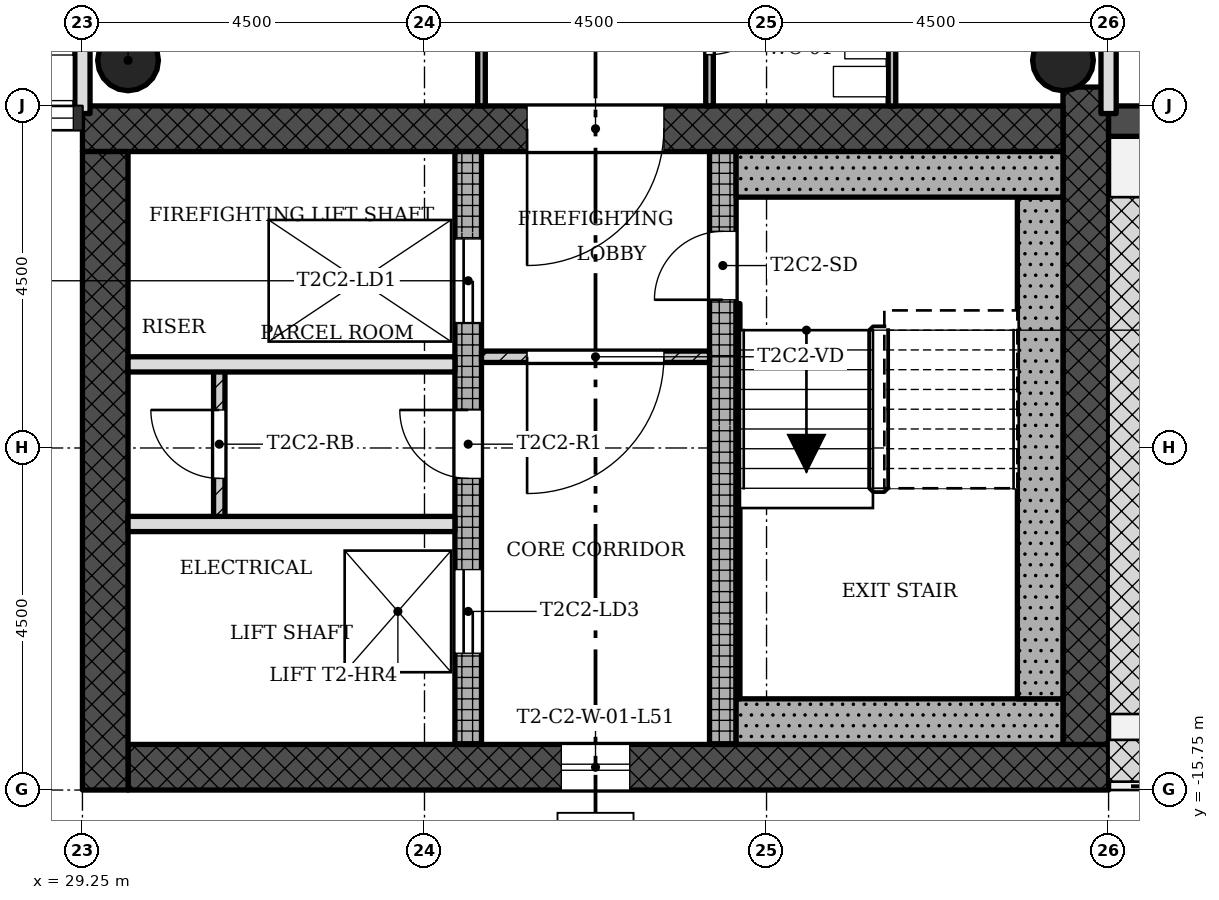
"""IFC4 building model, lengths in metres.
Left out: names, types, materials, properties, quantities, classifications, styles, units other than length and angle.
Written with IfcOpenShell. Run it as: python <this file> out.ifc"""

import sys

from ifc_helpers import new_model, si_unit, direction, frame, frame_2d, origin, origin_2d, place, context, subcontext, project, spatial, rectangle, hollow_circle, extrude, element, fill, save


model = new_model("IFC4")
c1 = context("Model", 3, precision=1e-05, world=origin(), true_north=direction((0.0, 1.0)))
c2 = subcontext(c1, "Body", "Model", "MODEL_VIEW")
j1 = project(units=[si_unit("LENGTHUNIT", "METRE"), si_unit("PLANEANGLEUNIT", "RADIAN")], contexts=[c1])
p1 = place(None, origin())
s1 = spatial("IfcSite", under=j1, at=p1, CompositionType="ELEMENT")
p2 = place(p1, origin())
s2 = spatial("IfcBuilding", under=s1, at=p2, CompositionType="ELEMENT")
p3 = place(p2, frame((0.0, 0.0, 185.8)))
s3 = spatial("IfcBuildingStorey", under=s2, at=p3, CompositionType="ELEMENT", Elevation=185.8)
p4 = place(p3, frame((29.85, -15.45, 0.0), z_axis=(0.0, 0.0, 1.0), x_axis=(1.0, 0.0, 0.0)))
e1 = element("IfcWall", 1, at=p4, inside=s3, PredefinedType="SHEAR", context=c2, shape_type="SweptSolid", body=[
    extrude(rectangle(XDim=12.9, YDim=0.6, at=frame_2d((6.45, 0.0))), origin(), (0.0, 0.0, 1.0), 3.4),
])
p5 = place(p4, frame((5.7, 0.0, 0.45)))
e2 = element("IfcOpeningElement", 2, at=p5, cuts=e1, PredefinedType="OPENING", context=c2, shape_type="SweptSolid", body=[
    extrude(rectangle(XDim=0.9, YDim=2.4, at=frame_2d((0.45, 1.2))), frame((0.0, 0.31, 0.0), z_axis=(0.0, -1.0, 0.0), x_axis=(1.0, 0.0, 0.0)), (0.0, 0.0, 1.0), 0.62),
])
p6 = place(p3, frame((42.45, -15.15, 0.0), z_axis=(0.0, 0.0, 1.0), x_axis=(0.0, 1.0, 0.0)))
e3 = element("IfcWall", 3, at=p6, inside=s3, PredefinedType="SHEAR", context=c2, shape_type="SweptSolid", body=[
    extrude(rectangle(XDim=8.648, YDim=0.6, at=frame_2d((4.324, 0.0))), origin(), (0.0, 0.0, 1.0), 3.4),
])
p7 = place(p3, frame((42.15, -7.05, 0.0), z_axis=(0.0, 0.0, 1.0), x_axis=(-1.0, 0.0, 0.0)))
e4 = element("IfcWall", 4, at=p7, inside=s3, PredefinedType="SHEAR", context=c2, shape_type="SweptSolid", body=[
    extrude(rectangle(XDim=12.9, YDim=0.6, at=frame_2d((6.45, 0.0))), origin(), (0.0, 0.0, 1.0), 3.4),
])
p8 = place(p7, frame((5.25, 0.0, 0.0)))
e5 = element("IfcOpeningElement", 5, at=p8, cuts=e4, PredefinedType="OPENING", context=c2, shape_type="SweptSolid", body=[
    extrude(rectangle(XDim=1.8, YDim=2.1, at=frame_2d((0.9, 1.05))), frame((0.0, 0.31, 0.0), z_axis=(0.0, -1.0, 0.0), x_axis=(1.0, 0.0, 0.0)), (0.0, 0.0, 1.0), 0.62),
])
p9 = place(p3, frame((29.55, -7.35, 0.0), z_axis=(0.0, 0.0, 1.0), x_axis=(0.0, -1.0, 0.0)))
e6 = element("IfcWall", 6, at=p9, inside=s3, PredefinedType="SHEAR", context=c2, shape_type="SweptSolid", body=[
    extrude(rectangle(XDim=8.4, YDim=0.6, at=frame_2d((4.2, 0.0))), origin(), (0.0, 0.0, 1.0), 3.4),
])
p10 = place(p3, frame((34.325, -15.15, 0.0), z_axis=(0.0, 0.0, 1.0), x_axis=(0.0, 1.0, 0.0)))
e7 = element("IfcWall", 7, at=p10, inside=s3, PredefinedType="SHEAR", context=c2, shape_type="SweptSolid", body=[
    extrude(rectangle(XDim=7.8, YDim=0.35, at=frame_2d((3.9, 0.0))), origin(), (0.0, 0.0, 1.0), 3.4),
])
p11 = place(p10, frame((5.55, 0.0, 0.0)))
e8 = element("IfcOpeningElement", 8, at=p11, cuts=e7, PredefinedType="OPENING", context=c2, shape_type="SweptSolid", body=[
    extrude(rectangle(XDim=1.1, YDim=2.1, at=frame_2d((0.55, 1.05))), frame((0.0, 0.185, 0.0), z_axis=(0.0, -1.0, 0.0), x_axis=(1.0, 0.0, 0.0)), (0.0, 0.0, 1.0), 0.37),
])
p12 = place(p10, frame((1.2, 0.0, 0.0)))
e9 = element("IfcOpeningElement", 9, at=p12, cuts=e7, PredefinedType="OPENING", context=c2, shape_type="SweptSolid", body=[
    extrude(rectangle(XDim=1.1, YDim=2.1, at=frame_2d((0.55, 1.05))), frame((0.0, 0.185, 0.0), z_axis=(0.0, -1.0, 0.0), x_axis=(1.0, 0.0, 0.0)), (0.0, 0.0, 1.0), 0.37),
])
p13 = place(p10, frame((3.5, 0.0, 0.0)))
e10 = element("IfcOpeningElement", 10, at=p13, cuts=e7, PredefinedType="OPENING", context=c2, shape_type="SweptSolid", body=[
    extrude(rectangle(XDim=0.9, YDim=2.1, at=frame_2d((0.45, 1.05))), frame((0.0, 0.185, 0.0), z_axis=(0.0, -1.0, 0.0), x_axis=(1.0, 0.0, 0.0)), (0.0, 0.0, 1.0), 0.37),
])
p14 = place(p3, frame((37.675, -15.15, 0.0), z_axis=(0.0, 0.0, 1.0), x_axis=(0.0, 1.0, 0.0)))
e11 = element("IfcWall", 11, at=p14, inside=s3, PredefinedType="SHEAR", context=c2, shape_type="SweptSolid", body=[
    extrude(rectangle(XDim=7.8, YDim=0.35, at=frame_2d((3.9, 0.0))), origin(), (0.0, 0.0, 1.0), 3.4),
])
p15 = place(p14, frame((5.85, 0.0, 0.0)))
e12 = element("IfcOpeningElement", 12, at=p15, cuts=e11, PredefinedType="OPENING", context=c2, shape_type="SweptSolid", body=[
    extrude(rectangle(XDim=0.9, YDim=2.1, at=frame_2d((0.45, 1.05))), frame((0.0, 0.185, 0.0), z_axis=(0.0, -1.0, 0.0), x_axis=(1.0, 0.0, 0.0)), (0.0, 0.0, 1.0), 0.37),
])
for number, where, z_axis, x_axis in (
    (13, (42.15, -6.15, 0.0), (0.0, 0.0, 1.0), (1.0, 0.0, 0.0)),
    (14, (29.85, -6.15, 0.0), (0.0, 0.0, 1.0), (1.0, 0.0, 0.0)),
):
    element("IfcColumn", number, at=place(p3, frame(where, z_axis=z_axis, x_axis=x_axis)), inside=s3, PredefinedType="COLUMN", context=c2, shape_type="SweptSolid", body=[
        extrude(hollow_circle(Radius=0.4, WallThickness=0.028, at=origin_2d()), origin(), (0.0, 0.0, 1.0), 3.4),
    ])
p16 = place(p3, frame((42.75, -6.95, -0.02), z_axis=(0.0, 0.0, 1.0), x_axis=(1.0, 0.0, 0.0)))
e15 = element("IfcWall", 15, at=p16, inside=s3, PredefinedType="STANDARD", context=c2, shape_type="SweptSolid", body=[
    extrude(rectangle(XDim=4.5, YDim=0.4, at=frame_2d((2.25, 0.0))), origin(), (0.0, 0.0, 1.0), 3.12),
])
p17 = place(p16, frame((1.35, 0.0, 0.02)))
e16 = element("IfcOpeningElement", 16, at=p17, cuts=e15, PredefinedType="OPENING", context=c2, shape_type="SweptSolid", body=[
    extrude(rectangle(XDim=1.8, YDim=2.1, at=frame_2d((0.9, 1.05))), frame((0.0, 0.21, 0.0), z_axis=(0.0, -1.0, 0.0), x_axis=(1.0, 0.0, 0.0)), (0.0, 0.0, 1.0), 0.42),
])
p18 = place(p3, frame((34.5, -10.05, 0.0), z_axis=(0.0, 0.0, 1.0), x_axis=(1.0, 0.0, 0.0)))
e17 = element("IfcWall", 17, at=p18, inside=s3, PredefinedType="PARTITIONING", context=c2, shape_type="SweptSolid", body=[
    extrude(rectangle(XDim=3.0, YDim=0.15, at=frame_2d((1.5, 0.0))), origin(), (0.0, 0.0, 1.0), 3.0),
])
p19 = place(p18, frame((0.6, 0.0, 0.0)))
e18 = element("IfcOpeningElement", 18, at=p19, cuts=e17, PredefinedType="OPENING", context=c2, shape_type="SweptSolid", body=[
    extrude(rectangle(XDim=1.8, YDim=2.1, at=frame_2d((0.9, 1.05))), frame((0.0, 0.085, 0.0), z_axis=(0.0, -1.0, 0.0), x_axis=(1.0, 0.0, 0.0)), (0.0, 0.0, 1.0), 0.17),
])
for number, where, z_axis, x_axis in (
    (19, (29.85, -12.25, 0.0), (0.0, 0.0, 1.0), (1.0, 0.0, 0.0)),
    (20, (29.85, -10.15, 0.0), (0.0, 0.0, 1.0), (1.0, 0.0, 0.0)),
):
    element("IfcWall", number, at=place(p3, frame(where, z_axis=z_axis, x_axis=x_axis)), inside=s3, PredefinedType="SOLIDWALL", context=c2, shape_type="SweptSolid", body=[
        extrude(rectangle(XDim=4.3, YDim=0.2, at=frame_2d((2.15, 0.0))), origin(), (0.0, 0.0, 1.0), 3.0),
    ])
p20 = place(p3, frame((31.05, -10.15, 0.0), z_axis=(0.0, 0.0, 1.0), x_axis=(0.0, -1.0, 0.0)))
e21 = element("IfcWall", 21, at=p20, inside=s3, PredefinedType="PARTITIONING", context=c2, shape_type="SweptSolid", body=[
    extrude(rectangle(XDim=2.1, YDim=0.15, at=frame_2d((1.05, 0.0))), origin(), (0.0, 0.0, 1.0), 3.0),
])
p21 = place(p20, frame((0.6, 0.0, 0.0)))
e22 = element("IfcOpeningElement", 22, at=p21, cuts=e21, PredefinedType="OPENING", context=c2, shape_type="SweptSolid", body=[
    extrude(rectangle(XDim=0.9, YDim=2.1, at=frame_2d((0.45, 1.05))), frame((0.0, 0.085, 0.0), z_axis=(0.0, -1.0, 0.0), x_axis=(1.0, 0.0, 0.0)), (0.0, 0.0, 1.0), 0.17),
])
p22 = place(p3, frame((42.75, -6.85, 0.0), z_axis=(0.0, 0.0, 1.0), x_axis=(0.0, 1.0, 0.0)))
e23 = element("IfcWall", 23, at=p22, inside=s3, PredefinedType="SOLIDWALL", context=c2, shape_type="SweptSolid", body=[
    extrude(rectangle(XDim=13.7, YDim=0.2, at=frame_2d((6.85, 0.0))), origin(), (0.0, 0.0, 1.0), 3.0),
])
p23 = place(p22, frame((6.4, 0.0, 0.0)))
e24 = element("IfcOpeningElement", 24, at=p23, cuts=e23, PredefinedType="OPENING", context=c2, shape_type="SweptSolid", body=[
    extrude(rectangle(XDim=0.9, YDim=2.1, at=frame_2d((0.45, 1.05))), frame((0.0, 0.11, 0.0), z_axis=(0.0, -1.0, 0.0), x_axis=(1.0, 0.0, 0.0)), (0.0, 0.0, 1.0), 0.22),
])
p24 = place(p3, frame((39.9, -6.75, 0.0), z_axis=(0.0, 0.0, 1.0), x_axis=(0.0, 1.0, 0.0)))
e25 = element("IfcWall", 25, at=p24, inside=s3, PredefinedType="PARTITIONING", context=c2, shape_type="SweptSolid", body=[
    extrude(rectangle(XDim=2.25, YDim=0.1, at=frame_2d((1.125, 0.0))), origin(), (0.0, 0.0, 1.0), 3.0),
])
p25 = place(p3, frame((37.5, -6.75, 0.0), z_axis=(0.0, 0.0, 1.0), x_axis=(0.0, 1.0, 0.0)))
e26 = element("IfcWall", 26, at=p25, inside=s3, PredefinedType="PARTITIONING", context=c2, shape_type="SweptSolid", body=[
    extrude(rectangle(XDim=2.25, YDim=0.1, at=frame_2d((1.125, 0.0))), origin(), (0.0, 0.0, 1.0), 3.0),
])
p26 = place(p25, frame((0.675, 0.0, 0.0)))
e27 = element("IfcOpeningElement", 27, at=p26, cuts=e26, PredefinedType="OPENING", context=c2, shape_type="SweptSolid", body=[
    extrude(rectangle(XDim=0.9, YDim=2.1, at=frame_2d((0.45, 1.05))), frame((0.0, 0.06, 0.0), z_axis=(0.0, -1.0, 0.0), x_axis=(1.0, 0.0, 0.0)), (0.0, 0.0, 1.0), 0.12),
])
p27 = place(p3, frame((34.5, -6.75, 0.0), z_axis=(0.0, 0.0, 1.0), x_axis=(0.0, 1.0, 0.0)))
e28 = element("IfcWall", 28, at=p27, inside=s3, PredefinedType="PARTITIONING", context=c2, shape_type="SweptSolid", body=[
    extrude(rectangle(XDim=2.25, YDim=0.1, at=frame_2d((1.125, 0.0))), origin(), (0.0, 0.0, 1.0), 3.0),
])
p28 = place(p3, frame((29.25, -6.85, 0.0), z_axis=(0.0, 0.0, 1.0), x_axis=(0.0, 1.0, 0.0)))
e29 = element("IfcWall", 29, at=p28, inside=s3, PredefinedType="SOLIDWALL", context=c2, shape_type="SweptSolid", body=[
    extrude(rectangle(XDim=5.95, YDim=0.2, at=frame_2d((2.975, 0.0))), origin(), (0.0, 0.0, 1.0), 3.0),
])
p29 = place(p3, frame((37.85, -14.85, 0.0), z_axis=(0.0, 0.0, 1.0), x_axis=(1.0, 0.0, 0.0)))
e30 = element("IfcWall", 30, at=p29, inside=s3, PredefinedType="SHEAR", context=c2, shape_type="SweptSolid", body=[
    extrude(rectangle(XDim=4.3, YDim=0.6, at=frame_2d((2.15, 0.0))), origin(), (0.0, 0.0, 1.0), 3.4),
])
p30 = place(p3, frame((41.85, -7.95, 0.0), z_axis=(0.0, 0.0, 1.0), x_axis=(0.0, -1.0, 0.0)))
e31 = element("IfcWall", 31, at=p30, inside=s3, PredefinedType="SHEAR", context=c2, shape_type="SweptSolid", body=[
    extrude(rectangle(XDim=6.6, YDim=0.6, at=frame_2d((3.3, 0.0))), origin(), (0.0, 0.0, 1.0), 3.4),
])
p31 = place(p3, frame((37.85, -7.65, 0.0), z_axis=(0.0, 0.0, 1.0), x_axis=(1.0, 0.0, 0.0)))
e32 = element("IfcWall", 32, at=p31, inside=s3, PredefinedType="SHEAR", context=c2, shape_type="SweptSolid", body=[
    extrude(rectangle(XDim=4.3, YDim=0.6, at=frame_2d((2.15, 0.0))), origin(), (0.0, 0.0, 1.0), 3.4),
])
p32 = place(p3, frame((37.875, -9.35, 0.0), z_axis=(0.0, 0.0, 1.0), x_axis=(0.0, -1.0, 0.0)))
e33 = element("IfcWall", 33, at=p32, inside=s3, PredefinedType="SHEAR", context=c2, shape_type="SweptSolid", body=[
    extrude(rectangle(XDim=5.2, YDim=0.05, at=frame_2d((2.6, 0.0))), origin(), (0.0, 0.0, 1.0), 3.4),
])
p33 = place(p5, origin())
e34 = element("IfcWindow", 34, at=p33, inside=s3, PartitioningType="SINGLE_PANEL", PredefinedType="WINDOW", context=c2, shape_type="SweptSolid", body=[
    extrude(rectangle(XDim=0.9, YDim=2.4, at=frame_2d((0.45, 1.2))), frame((0.0, 0.03, 0.0), z_axis=(0.0, -1.0, 0.0), x_axis=(1.0, 0.0, 0.0)), (0.0, 0.0, 1.0), 0.06),
])
fill(e2, e34)
p34 = place(p19, origin())
e35 = element("IfcDoor", 35, at=p34, inside=s3, OperationType="SINGLE_SWING_LEFT", PredefinedType="DOOR", context=c2, shape_type="SweptSolid", body=[
    extrude(rectangle(XDim=1.8, YDim=2.1, at=frame_2d((0.9, 1.05))), frame((0.0, 0.025, 0.0), z_axis=(0.0, -1.0, 0.0), x_axis=(1.0, 0.0, 0.0)), (0.0, 0.0, 1.0), 0.05),
])
fill(e18, e35)
p35 = place(p21, origin())
e36 = element("IfcDoor", 36, at=p35, inside=s3, OperationType="SINGLE_SWING_LEFT", PredefinedType="DOOR", context=c2, shape_type="SweptSolid", body=[
    extrude(rectangle(XDim=0.9, YDim=2.1, at=frame_2d((0.45, 1.05))), frame((0.0, 0.025, 0.0), z_axis=(0.0, -1.0, 0.0), x_axis=(1.0, 0.0, 0.0)), (0.0, 0.0, 1.0), 0.05),
])
fill(e22, e36)
p36 = place(p26, origin())
e37 = element("IfcDoor", 37, at=p36, inside=s3, OperationType="SINGLE_SWING_RIGHT", PredefinedType="DOOR", context=c2, shape_type="SweptSolid", body=[
    extrude(rectangle(XDim=0.9, YDim=2.1, at=frame_2d((0.45, 1.05))), frame((0.0, 0.025, 0.0), z_axis=(0.0, -1.0, 0.0), x_axis=(1.0, 0.0, 0.0)), (0.0, 0.0, 1.0), 0.05),
])
fill(e27, e37)
p37 = place(p15, origin())
e38 = element("IfcDoor", 38, at=p37, inside=s3, OperationType="SINGLE_SWING_RIGHT", PredefinedType="DOOR", context=c2, shape_type="SweptSolid", body=[
    extrude(rectangle(XDim=0.9, YDim=2.1, at=frame_2d((0.45, 1.05))), frame((0.0, 0.025, 0.0), z_axis=(0.0, -1.0, 0.0), x_axis=(1.0, 0.0, 0.0)), (0.0, 0.0, 1.0), 0.05),
])
fill(e12, e38)
p38 = place(p11, origin())
e39 = element("IfcDoor", 39, at=p38, inside=s3, OperationType="SLIDING_TO_LEFT", PredefinedType="DOOR", context=c2, shape_type="SweptSolid", body=[
    extrude(rectangle(XDim=1.1, YDim=2.1, at=frame_2d((0.55, 1.05))), frame((0.0, 0.025, 0.0), z_axis=(0.0, -1.0, 0.0), x_axis=(1.0, 0.0, 0.0)), (0.0, 0.0, 1.0), 0.05),
])
fill(e8, e39)
p39 = place(p12, origin())
e40 = element("IfcDoor", 40, at=p39, inside=s3, OperationType="SLIDING_TO_LEFT", PredefinedType="DOOR", context=c2, shape_type="SweptSolid", body=[
    extrude(rectangle(XDim=1.1, YDim=2.1, at=frame_2d((0.55, 1.05))), frame((0.0, 0.025, 0.0), z_axis=(0.0, -1.0, 0.0), x_axis=(1.0, 0.0, 0.0)), (0.0, 0.0, 1.0), 0.05),
])
fill(e9, e40)
p40 = place(p13, origin())
e41 = element("IfcDoor", 41, at=p40, inside=s3, OperationType="SINGLE_SWING_LEFT", PredefinedType="DOOR", context=c2, shape_type="SweptSolid", body=[
    extrude(rectangle(XDim=0.9, YDim=2.1, at=frame_2d((0.45, 1.05))), frame((0.0, 0.025, 0.0), z_axis=(0.0, -1.0, 0.0), x_axis=(1.0, 0.0, 0.0)), (0.0, 0.0, 1.0), 0.05),
])
fill(e10, e41)
p41 = place(p8, origin())
e42 = element("IfcDoor", 42, at=p41, inside=s3, OperationType="SINGLE_SWING_LEFT", PredefinedType="DOOR", context=c2, shape_type="SweptSolid", body=[
    extrude(rectangle(XDim=1.8, YDim=2.1, at=frame_2d((0.9, 1.05))), frame((0.0, 0.025, 0.0), z_axis=(0.0, -1.0, 0.0), x_axis=(1.0, 0.0, 0.0)), (0.0, 0.0, 1.0), 0.05),
])
fill(e5, e42)
save(model, sys.argv[1])
